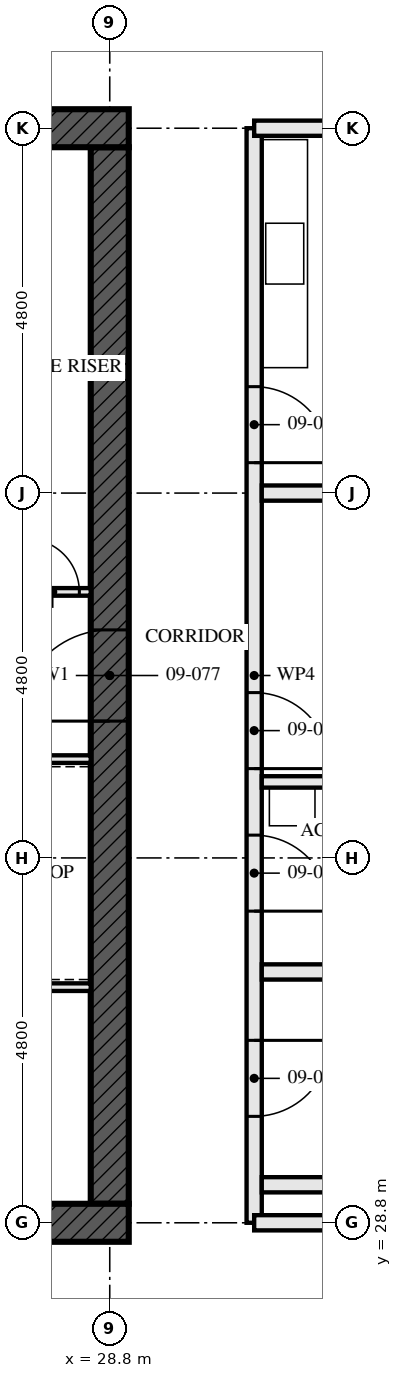
"""IFC4 building model, lengths in metres.
Left out: names, types, materials, properties, quantities, classifications, styles, units other than length and angle.
Written with IfcOpenShell. Run it as: python <this file> out.ifc"""

import sys

from ifc_helpers import new_model, si_unit, direction, frame, frame_2d, origin, place, context, subcontext, project, spatial, rectangle, extrude, element, fill, save


model = new_model("IFC4")
c1 = context("Model", 3, precision=1e-05, world=origin(), true_north=direction((0.0, 1.0)))
c2 = subcontext(c1, "Body", "Model", "MODEL_VIEW")
j1 = project(units=[si_unit("LENGTHUNIT", "METRE"), si_unit("PLANEANGLEUNIT", "RADIAN")], contexts=[c1])
p1 = place(None, origin())
s1 = spatial("IfcSite", under=j1, at=p1, CompositionType="ELEMENT")
p2 = place(p1, origin())
s2 = spatial("IfcBuilding", under=s1, at=p2, CompositionType="ELEMENT")
p3 = place(p2, frame((0.0, 0.0, 37.5)))
s3 = spatial("IfcBuildingStorey", under=s2, at=p3, CompositionType="ELEMENT", Elevation=37.5)
p4 = place(p3, frame((14.15, 28.8, -0.17), z_axis=(0.0, 0.0, 1.0), x_axis=(1.0, 0.0, 0.0)))
e1 = element("IfcWall", 1, at=p4, inside=s3, PredefinedType="SHEAR", context=c2, shape_type="SweptSolid", body=[
    extrude(rectangle(XDim=14.9, YDim=0.5, at=frame_2d((7.45, 0.0))), origin(), (0.0, 0.0, 1.0), 3.5),
])
p5 = place(p4, frame((6.85, 0.0, 0.17)))
e2 = element("IfcOpeningElement", 2, at=p5, cuts=e1, PredefinedType="OPENING", context=c2, shape_type="SweptSolid", body=[
    extrude(rectangle(XDim=1.2, YDim=2.1, at=frame_2d((0.6, 1.05))), frame((0.0, 0.26, 0.0), z_axis=(0.0, -1.0, 0.0), x_axis=(1.0, 0.0, 0.0)), (0.0, 0.0, 1.0), 0.521),
])
p6 = place(p3, frame((29.05, 43.2, -0.17), z_axis=(0.0, 0.0, 1.0), x_axis=(-1.0, 0.0, 0.0)))
e3 = element("IfcWall", 3, at=p6, inside=s3, PredefinedType="SHEAR", context=c2, shape_type="SweptSolid", body=[
    extrude(rectangle(XDim=14.9, YDim=0.5, at=frame_2d((7.45, 0.0))), origin(), (0.0, 0.0, 1.0), 3.5),
])
p7 = place(p6, frame((6.85, 0.0, 0.17)))
e4 = element("IfcOpeningElement", 4, at=p7, cuts=e3, PredefinedType="OPENING", context=c2, shape_type="SweptSolid", body=[
    extrude(rectangle(XDim=1.2, YDim=2.1, at=frame_2d((0.6, 1.05))), frame((0.0, 0.26, 0.0), z_axis=(0.0, -1.0, 0.0), x_axis=(1.0, 0.0, 0.0)), (0.0, 0.0, 1.0), 0.521),
])
p8 = place(p3, frame((28.8, 29.05, -0.17), z_axis=(0.0, 0.0, 1.0), x_axis=(0.0, 1.0, 0.0)))
e5 = element("IfcWall", 5, at=p8, inside=s3, PredefinedType="SHEAR", context=c2, shape_type="SweptSolid", body=[
    extrude(rectangle(XDim=13.9, YDim=0.5, at=frame_2d((6.95, 0.0))), origin(), (0.0, 0.0, 1.0), 3.5),
])
p9 = place(p8, frame((6.35, 0.0, 0.17)))
e6 = element("IfcOpeningElement", 6, at=p9, cuts=e5, PredefinedType="OPENING", context=c2, shape_type="SweptSolid", body=[
    extrude(rectangle(XDim=1.2, YDim=2.1, at=frame_2d((0.6, 1.05))), frame((0.0, 0.26, 0.0), z_axis=(0.0, -1.0, 0.0), x_axis=(1.0, 0.0, 0.0)), (0.0, 0.0, 1.0), 0.521),
])
for number, where, z_axis, x_axis in (
    (7, (35.5, 29.3, 0.0), (0.0, 0.0, 1.0), (-1.0, 0.0, 0.0)),
    (8, (35.5, 32.1, 0.0), (0.0, 0.0, 1.0), (-1.0, 0.0, 0.0)),
):
    element("IfcWall", number, at=place(p3, frame(where, z_axis=z_axis, x_axis=x_axis)), inside=s3, PredefinedType="SOLIDWALL", context=c2, shape_type="SweptSolid", body=[
        extrude(rectangle(XDim=4.7, YDim=0.2, at=frame_2d((2.35, 0.0))), origin(), (0.0, 0.0, 1.0), 2.99),
    ])
p10 = place(p3, frame((33.8, 34.6, 0.0), z_axis=(0.0, 0.0, 1.0), x_axis=(-1.0, 0.0, 0.0)))
e9 = element("IfcWall", 9, at=p10, inside=s3, PredefinedType="PARTITIONING", context=c2, shape_type="SweptSolid", body=[
    extrude(rectangle(XDim=3.0, YDim=0.15, at=frame_2d((1.5, 0.0))), origin(), (0.0, 0.0, 1.0), 3.33),
])
p11 = place(p3, frame((42.805, 38.4, 0.0), z_axis=(0.0, 0.0, 1.0), x_axis=(-1.0, 0.0, 0.0)))
e10 = element("IfcWall", 10, at=p11, inside=s3, PredefinedType="PARTITIONING", context=c2, shape_type="SweptSolid", body=[
    extrude(rectangle(XDim=12.005, YDim=0.2, at=frame_2d((6.002, 0.0))), origin(), (0.0, 0.0, 1.0), 2.55),
])
p12 = place(p3, frame((30.7, 28.8, 0.0), z_axis=(0.0, 0.0, 1.0), x_axis=(0.0, 1.0, 0.0)))
e11 = element("IfcWall", 11, at=p12, inside=s3, PredefinedType="PARTITIONING", context=c2, shape_type="SweptSolid", body=[
    extrude(rectangle(XDim=14.4, YDim=0.2, at=frame_2d((7.2, 0.0))), origin(), (0.0, 0.0, 1.0), 2.55),
])
p13 = place(p12, frame((1.4, 0.0, 0.0)))
e12 = element("IfcOpeningElement", 12, at=p13, cuts=e11, PredefinedType="OPENING", context=c2, shape_type="SweptSolid", body=[
    extrude(rectangle(XDim=1.0, YDim=2.1, at=frame_2d((0.5, 1.05))), frame((0.0, 0.111, 0.0), z_axis=(0.0, -1.0, 0.0), x_axis=(1.0, 0.0, 0.0)), (0.0, 0.0, 1.0), 0.221),
])
p14 = place(p12, frame((4.1, 0.0, 0.0)))
e13 = element("IfcOpeningElement", 13, at=p14, cuts=e11, PredefinedType="OPENING", context=c2, shape_type="SweptSolid", body=[
    extrude(rectangle(XDim=1.0, YDim=2.1, at=frame_2d((0.5, 1.05))), frame((0.0, 0.111, 0.0), z_axis=(0.0, -1.0, 0.0), x_axis=(1.0, 0.0, 0.0)), (0.0, 0.0, 1.0), 0.221),
])
p15 = place(p12, frame((5.975, 0.0, 0.0)))
e14 = element("IfcOpeningElement", 14, at=p15, cuts=e11, PredefinedType="OPENING", context=c2, shape_type="SweptSolid", body=[
    extrude(rectangle(XDim=1.0, YDim=2.1, at=frame_2d((0.5, 1.05))), frame((0.0, 0.111, 0.0), z_axis=(0.0, -1.0, 0.0), x_axis=(1.0, 0.0, 0.0)), (0.0, 0.0, 1.0), 0.221),
])
p16 = place(p12, frame((10.0, 0.0, 0.0)))
e15 = element("IfcOpeningElement", 15, at=p16, cuts=e11, PredefinedType="OPENING", context=c2, shape_type="SweptSolid", body=[
    extrude(rectangle(XDim=1.0, YDim=2.1, at=frame_2d((0.5, 1.05))), frame((0.0, 0.111, 0.0), z_axis=(0.0, -1.0, 0.0), x_axis=(1.0, 0.0, 0.0)), (0.0, 0.0, 1.0), 0.221),
])
p17 = place(p3, frame((23.05, 34.9, 0.0), z_axis=(0.0, 0.0, 1.0), x_axis=(1.0, 0.0, 0.0)))
e16 = element("IfcWall", 16, at=p17, inside=s3, PredefinedType="SOLIDWALL", context=c2, shape_type="SweptSolid", body=[
    extrude(rectangle(XDim=5.5, YDim=0.1, at=frame_2d((2.75, 0.0))), origin(), (0.0, 0.0, 1.0), 3.33),
])
p18 = place(p3, frame((22.65, 37.1, 0.0), z_axis=(0.0, 0.0, 1.0), x_axis=(1.0, 0.0, 0.0)))
e17 = element("IfcWall", 17, at=p18, inside=s3, PredefinedType="SOLIDWALL", context=c2, shape_type="SweptSolid", body=[
    extrude(rectangle(XDim=5.9, YDim=0.1, at=frame_2d((2.95, 0.0))), origin(), (0.0, 0.0, 1.0), 3.33),
])
p19 = place(p18, frame((3.5, 0.0, 0.0)))
e18 = element("IfcOpeningElement", 18, at=p19, cuts=e17, PredefinedType="OPENING", context=c2, shape_type="SweptSolid", body=[
    extrude(rectangle(XDim=0.9, YDim=2.1, at=frame_2d((0.45, 1.05))), frame((0.0, 0.061, 0.0), z_axis=(0.0, -1.0, 0.0), x_axis=(1.0, 0.0, 0.0)), (0.0, 0.0, 1.0), 0.121),
])
p20 = place(p18, frame((5.05, 0.0, 0.0)))
e19 = element("IfcOpeningElement", 19, at=p20, cuts=e17, PredefinedType="OPENING", context=c2, shape_type="SweptSolid", body=[
    extrude(rectangle(XDim=0.7, YDim=2.1, at=frame_2d((0.35, 1.05))), frame((0.0, 0.061, 0.0), z_axis=(0.0, -1.0, 0.0), x_axis=(1.0, 0.0, 0.0)), (0.0, 0.0, 1.0), 0.121),
])
p21 = place(p3, frame((23.15, 31.9, 0.0), z_axis=(0.0, 0.0, 1.0), x_axis=(1.0, 0.0, 0.0)))
e20 = element("IfcWall", 20, at=p21, inside=s3, PredefinedType="SOLIDWALL", context=c2, shape_type="SweptSolid", body=[
    extrude(rectangle(XDim=5.4, YDim=0.1, at=frame_2d((2.7, 0.0))), origin(), (0.0, 0.0, 1.0), 3.33),
])
for number, where, z_axis, x_axis in (
    (21, (33.205, 28.8, 0.0), (0.0, 0.0, 1.0), (-1.0, 0.0, 0.0)),
    (22, (33.205, 43.2, 0.0), (0.0, 0.0, 1.0), (-1.0, 0.0, 0.0)),
):
    element("IfcWall", number, at=place(p3, frame(where, z_axis=z_axis, x_axis=x_axis)), inside=s3, PredefinedType="PARTITIONING", context=c2, shape_type="SweptSolid", body=[
        extrude(rectangle(XDim=2.505, YDim=0.2, at=frame_2d((1.252, 0.0))), origin(), (0.0, 0.0, 1.0), 2.32),
    ])
p22 = place(p13, frame((1.0, 0.0, 0.0), z_axis=(0.0, 0.0, 1.0), x_axis=(-1.0, 0.0, 0.0)))
e23 = element("IfcDoor", 23, at=p22, inside=s3, OperationType="SINGLE_SWING_RIGHT", PredefinedType="DOOR", context=c2, shape_type="SweptSolid", body=[
    extrude(rectangle(XDim=1.0, YDim=2.1, at=frame_2d((0.5, 1.05))), frame((0.0, 0.032, 0.0), z_axis=(0.0, -1.0, 0.0), x_axis=(1.0, 0.0, 0.0)), (0.0, 0.0, 1.0), 0.064),
])
fill(e12, e23)
p23 = place(p14, frame((1.0, 0.0, 0.0), z_axis=(0.0, 0.0, 1.0), x_axis=(-1.0, 0.0, 0.0)))
e24 = element("IfcDoor", 24, at=p23, inside=s3, OperationType="SINGLE_SWING_LEFT", PredefinedType="DOOR", context=c2, shape_type="SweptSolid", body=[
    extrude(rectangle(XDim=1.0, YDim=2.1, at=frame_2d((0.5, 1.05))), frame((0.0, 0.027, 0.0), z_axis=(0.0, -1.0, 0.0), x_axis=(1.0, 0.0, 0.0)), (0.0, 0.0, 1.0), 0.054),
])
fill(e13, e24)
p24 = place(p15, frame((1.0, 0.0, 0.0), z_axis=(0.0, 0.0, 1.0), x_axis=(-1.0, 0.0, 0.0)))
e25 = element("IfcDoor", 25, at=p24, inside=s3, OperationType="SINGLE_SWING_LEFT", PredefinedType="DOOR", context=c2, shape_type="SweptSolid", body=[
    extrude(rectangle(XDim=1.0, YDim=2.1, at=frame_2d((0.5, 1.05))), frame((0.0, 0.027, 0.0), z_axis=(0.0, -1.0, 0.0), x_axis=(1.0, 0.0, 0.0)), (0.0, 0.0, 1.0), 0.054),
])
fill(e14, e25)
p25 = place(p16, frame((1.0, 0.0, 0.0), z_axis=(0.0, 0.0, 1.0), x_axis=(-1.0, 0.0, 0.0)))
e26 = element("IfcDoor", 26, at=p25, inside=s3, OperationType="SINGLE_SWING_LEFT", PredefinedType="DOOR", context=c2, shape_type="SweptSolid", body=[
    extrude(rectangle(XDim=1.0, YDim=2.1, at=frame_2d((0.5, 1.05))), frame((0.0, 0.027, 0.0), z_axis=(0.0, -1.0, 0.0), x_axis=(1.0, 0.0, 0.0)), (0.0, 0.0, 1.0), 0.054),
])
fill(e15, e26)
p26 = place(p20, origin())
e27 = element("IfcDoor", 27, at=p26, inside=s3, OperationType="SINGLE_SWING_RIGHT", PredefinedType="DOOR", context=c2, shape_type="SweptSolid", body=[
    extrude(rectangle(XDim=0.7, YDim=2.1, at=frame_2d((0.35, 1.05))), frame((0.0, 0.027, 0.0), z_axis=(0.0, -1.0, 0.0), x_axis=(1.0, 0.0, 0.0)), (0.0, 0.0, 1.0), 0.054),
])
fill(e19, e27)
p27 = place(p9, origin())
e28 = element("IfcDoor", 28, at=p27, inside=s3, OperationType="SINGLE_SWING_LEFT", PredefinedType="DOOR", context=c2, shape_type="SweptSolid", body=[
    extrude(rectangle(XDim=1.2, YDim=2.1, at=frame_2d((0.6, 1.05))), frame((0.0, 0.027, 0.0), z_axis=(0.0, -1.0, 0.0), x_axis=(1.0, 0.0, 0.0)), (0.0, 0.0, 1.0), 0.054),
])
fill(e6, e28)
save(model, sys.argv[1])
